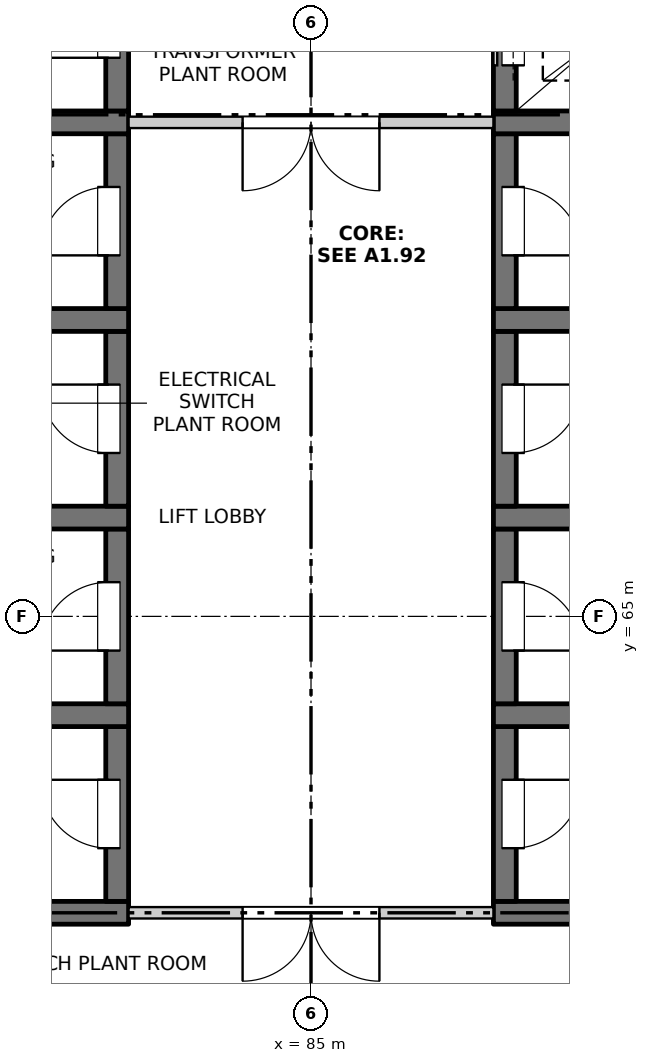
"""IFC4 building model, lengths in metres.
Left out: names, types, materials, properties, quantities, classifications, styles, units other than length and angle.
Written with IfcOpenShell. Run it as: python <this file> out.ifc"""

import sys

from ifc_helpers import new_model, si_unit, direction, frame, frame_2d, origin, place, context, subcontext, project, spatial, rectangle, extrude, element, fill, save


model = new_model("IFC4")
c1 = context("Model", 3, precision=1e-05, world=origin(), true_north=direction((0.0, 1.0)))
c2 = subcontext(c1, "Body", "Model", "MODEL_VIEW")
j1 = project(units=[si_unit("LENGTHUNIT", "METRE"), si_unit("PLANEANGLEUNIT", "RADIAN")], contexts=[c1])
p1 = place(None, origin())
s1 = spatial("IfcSite", under=j1, at=p1, CompositionType="ELEMENT")
p2 = place(p1, origin())
s2 = spatial("IfcBuilding", under=s1, at=p2, CompositionType="ELEMENT")
p3 = place(p2, frame((0.0, 0.0, 144.1)))
s3 = spatial("IfcBuildingStorey", under=s2, at=p3, CompositionType="ELEMENT", Elevation=144.1)
p4 = place(p3, frame((79.6, 61.1, -0.3), z_axis=(0.0, 0.0, 1.0), x_axis=(1.0, 0.0, 0.0)))
e1 = element("IfcWall", 1, at=p4, inside=s3, PredefinedType="SOLIDWALL", context=c2, shape_type="SweptSolid", body=[
    extrude(rectangle(XDim=3.0, YDim=0.3, at=frame_2d((1.5, 0.0))), origin(), (0.0, 0.0, 1.0), 4.5),
])
p5 = place(p3, frame((82.45, 61.25, -0.3), z_axis=(0.0, 0.0, 1.0), x_axis=(0.0, 1.0, 0.0)))
e2 = element("IfcWall", 2, at=p5, inside=s3, PredefinedType="SOLIDWALL", context=c2, shape_type="SweptSolid", body=[
    extrude(rectangle(XDim=2.3, YDim=0.3, at=frame_2d((1.15, 0.0))), origin(), (0.0, 0.0, 1.0), 4.5),
])
p6 = place(p5, frame((0.7, 0.0, 0.3)))
e3 = element("IfcOpeningElement", 3, at=p6, cuts=e2, PredefinedType="OPENING", context=c2, shape_type="SweptSolid", body=[
    extrude(rectangle(XDim=0.9, YDim=2.1, at=frame_2d((0.45, 1.05))), frame((0.0, 0.16, 0.0), z_axis=(0.0, -1.0, 0.0), x_axis=(1.0, 0.0, 0.0)), (0.0, 0.0, 1.0), 0.32),
])
p7 = place(p3, frame((79.6, 63.7, -0.3), z_axis=(0.0, 0.0, 1.0), x_axis=(1.0, 0.0, 0.0)))
e4 = element("IfcWall", 4, at=p7, inside=s3, PredefinedType="SOLIDWALL", context=c2, shape_type="SweptSolid", body=[
    extrude(rectangle(XDim=3.0, YDim=0.3, at=frame_2d((1.5, 0.0))), origin(), (0.0, 0.0, 1.0), 4.5),
])
p8 = place(p3, frame((82.45, 63.85, -0.3), z_axis=(0.0, 0.0, 1.0), x_axis=(0.0, 1.0, 0.0)))
e5 = element("IfcWall", 5, at=p8, inside=s3, PredefinedType="SOLIDWALL", context=c2, shape_type="SweptSolid", body=[
    extrude(rectangle(XDim=2.3, YDim=0.3, at=frame_2d((1.15, 0.0))), origin(), (0.0, 0.0, 1.0), 4.5),
])
p9 = place(p8, frame((0.7, 0.0, 0.3)))
e6 = element("IfcOpeningElement", 6, at=p9, cuts=e5, PredefinedType="OPENING", context=c2, shape_type="SweptSolid", body=[
    extrude(rectangle(XDim=0.9, YDim=2.1, at=frame_2d((0.45, 1.05))), frame((0.0, 0.16, 0.0), z_axis=(0.0, -1.0, 0.0), x_axis=(1.0, 0.0, 0.0)), (0.0, 0.0, 1.0), 0.32),
])
p10 = place(p3, frame((79.6, 66.3, -0.3), z_axis=(0.0, 0.0, 1.0), x_axis=(1.0, 0.0, 0.0)))
e7 = element("IfcWall", 7, at=p10, inside=s3, PredefinedType="SOLIDWALL", context=c2, shape_type="SweptSolid", body=[
    extrude(rectangle(XDim=3.0, YDim=0.3, at=frame_2d((1.5, 0.0))), origin(), (0.0, 0.0, 1.0), 4.5),
])
p11 = place(p3, frame((82.45, 66.45, -0.3), z_axis=(0.0, 0.0, 1.0), x_axis=(0.0, 1.0, 0.0)))
e8 = element("IfcWall", 8, at=p11, inside=s3, PredefinedType="SOLIDWALL", context=c2, shape_type="SweptSolid", body=[
    extrude(rectangle(XDim=2.3, YDim=0.3, at=frame_2d((1.15, 0.0))), origin(), (0.0, 0.0, 1.0), 4.5),
])
p12 = place(p11, frame((0.7, 0.0, 0.3)))
e9 = element("IfcOpeningElement", 9, at=p12, cuts=e8, PredefinedType="OPENING", context=c2, shape_type="SweptSolid", body=[
    extrude(rectangle(XDim=0.9, YDim=2.1, at=frame_2d((0.45, 1.05))), frame((0.0, 0.16, 0.0), z_axis=(0.0, -1.0, 0.0), x_axis=(1.0, 0.0, 0.0)), (0.0, 0.0, 1.0), 0.32),
])
p13 = place(p3, frame((79.6, 68.9, -0.3), z_axis=(0.0, 0.0, 1.0), x_axis=(1.0, 0.0, 0.0)))
e10 = element("IfcWall", 10, at=p13, inside=s3, PredefinedType="SOLIDWALL", context=c2, shape_type="SweptSolid", body=[
    extrude(rectangle(XDim=3.0, YDim=0.3, at=frame_2d((1.5, 0.0))), origin(), (0.0, 0.0, 1.0), 4.5),
])
p14 = place(p3, frame((82.45, 69.05, -0.3), z_axis=(0.0, 0.0, 1.0), x_axis=(0.0, 1.0, 0.0)))
e11 = element("IfcWall", 11, at=p14, inside=s3, PredefinedType="SOLIDWALL", context=c2, shape_type="SweptSolid", body=[
    extrude(rectangle(XDim=2.3, YDim=0.3, at=frame_2d((1.15, 0.0))), origin(), (0.0, 0.0, 1.0), 4.5),
])
p15 = place(p14, frame((0.7, 0.0, 0.3)))
e12 = element("IfcOpeningElement", 12, at=p15, cuts=e11, PredefinedType="OPENING", context=c2, shape_type="SweptSolid", body=[
    extrude(rectangle(XDim=0.9, YDim=2.1, at=frame_2d((0.45, 1.05))), frame((0.0, 0.16, 0.0), z_axis=(0.0, -1.0, 0.0), x_axis=(1.0, 0.0, 0.0)), (0.0, 0.0, 1.0), 0.32),
])
p16 = place(p3, frame((79.6, 71.5, -0.3), z_axis=(0.0, 0.0, 1.0), x_axis=(1.0, 0.0, 0.0)))
e13 = element("IfcWall", 13, at=p16, inside=s3, PredefinedType="SOLIDWALL", context=c2, shape_type="SweptSolid", body=[
    extrude(rectangle(XDim=3.0, YDim=0.3, at=frame_2d((1.5, 0.0))), origin(), (0.0, 0.0, 1.0), 4.5),
])
p17 = place(p3, frame((82.45, 71.65, -0.3), z_axis=(0.0, 0.0, 1.0), x_axis=(0.0, 1.0, 0.0)))
e14 = element("IfcWall", 14, at=p17, inside=s3, PredefinedType="SOLIDWALL", context=c2, shape_type="SweptSolid", body=[
    extrude(rectangle(XDim=2.3, YDim=0.3, at=frame_2d((1.15, 0.0))), origin(), (0.0, 0.0, 1.0), 4.5),
])
p18 = place(p17, frame((0.7, 0.0, 0.3)))
e15 = element("IfcOpeningElement", 15, at=p18, cuts=e14, PredefinedType="OPENING", context=c2, shape_type="SweptSolid", body=[
    extrude(rectangle(XDim=0.9, YDim=2.1, at=frame_2d((0.45, 1.05))), frame((0.0, 0.16, 0.0), z_axis=(0.0, -1.0, 0.0), x_axis=(1.0, 0.0, 0.0)), (0.0, 0.0, 1.0), 0.32),
])
p19 = place(p3, frame((87.4, 61.1, -0.3), z_axis=(0.0, 0.0, 1.0), x_axis=(1.0, 0.0, 0.0)))
e16 = element("IfcWall", 16, at=p19, inside=s3, PredefinedType="SOLIDWALL", context=c2, shape_type="SweptSolid", body=[
    extrude(rectangle(XDim=3.0, YDim=0.3, at=frame_2d((1.5, 0.0))), origin(), (0.0, 0.0, 1.0), 4.5),
])
p20 = place(p3, frame((87.55, 61.25, -0.3), z_axis=(0.0, 0.0, 1.0), x_axis=(0.0, 1.0, 0.0)))
e17 = element("IfcWall", 17, at=p20, inside=s3, PredefinedType="SOLIDWALL", context=c2, shape_type="SweptSolid", body=[
    extrude(rectangle(XDim=2.3, YDim=0.3, at=frame_2d((1.15, 0.0))), origin(), (0.0, 0.0, 1.0), 4.5),
])
p21 = place(p20, frame((0.7, 0.0, 0.3)))
e18 = element("IfcOpeningElement", 18, at=p21, cuts=e17, PredefinedType="OPENING", context=c2, shape_type="SweptSolid", body=[
    extrude(rectangle(XDim=0.9, YDim=2.1, at=frame_2d((0.45, 1.05))), frame((0.0, 0.16, 0.0), z_axis=(0.0, -1.0, 0.0), x_axis=(1.0, 0.0, 0.0)), (0.0, 0.0, 1.0), 0.32),
])
p22 = place(p3, frame((87.4, 63.7, -0.3), z_axis=(0.0, 0.0, 1.0), x_axis=(1.0, 0.0, 0.0)))
e19 = element("IfcWall", 19, at=p22, inside=s3, PredefinedType="SOLIDWALL", context=c2, shape_type="SweptSolid", body=[
    extrude(rectangle(XDim=3.0, YDim=0.3, at=frame_2d((1.5, 0.0))), origin(), (0.0, 0.0, 1.0), 4.5),
])
p23 = place(p3, frame((87.55, 63.85, -0.3), z_axis=(0.0, 0.0, 1.0), x_axis=(0.0, 1.0, 0.0)))
e20 = element("IfcWall", 20, at=p23, inside=s3, PredefinedType="SOLIDWALL", context=c2, shape_type="SweptSolid", body=[
    extrude(rectangle(XDim=2.3, YDim=0.3, at=frame_2d((1.15, 0.0))), origin(), (0.0, 0.0, 1.0), 4.5),
])
p24 = place(p23, frame((0.7, 0.0, 0.3)))
e21 = element("IfcOpeningElement", 21, at=p24, cuts=e20, PredefinedType="OPENING", context=c2, shape_type="SweptSolid", body=[
    extrude(rectangle(XDim=0.9, YDim=2.1, at=frame_2d((0.45, 1.05))), frame((0.0, 0.16, 0.0), z_axis=(0.0, -1.0, 0.0), x_axis=(1.0, 0.0, 0.0)), (0.0, 0.0, 1.0), 0.32),
])
p25 = place(p3, frame((87.4, 66.3, -0.3), z_axis=(0.0, 0.0, 1.0), x_axis=(1.0, 0.0, 0.0)))
e22 = element("IfcWall", 22, at=p25, inside=s3, PredefinedType="SOLIDWALL", context=c2, shape_type="SweptSolid", body=[
    extrude(rectangle(XDim=3.0, YDim=0.3, at=frame_2d((1.5, 0.0))), origin(), (0.0, 0.0, 1.0), 4.5),
])
p26 = place(p3, frame((87.55, 66.45, -0.3), z_axis=(0.0, 0.0, 1.0), x_axis=(0.0, 1.0, 0.0)))
e23 = element("IfcWall", 23, at=p26, inside=s3, PredefinedType="SOLIDWALL", context=c2, shape_type="SweptSolid", body=[
    extrude(rectangle(XDim=2.3, YDim=0.3, at=frame_2d((1.15, 0.0))), origin(), (0.0, 0.0, 1.0), 4.5),
])
p27 = place(p26, frame((0.7, 0.0, 0.3)))
e24 = element("IfcOpeningElement", 24, at=p27, cuts=e23, PredefinedType="OPENING", context=c2, shape_type="SweptSolid", body=[
    extrude(rectangle(XDim=0.9, YDim=2.1, at=frame_2d((0.45, 1.05))), frame((0.0, 0.16, 0.0), z_axis=(0.0, -1.0, 0.0), x_axis=(1.0, 0.0, 0.0)), (0.0, 0.0, 1.0), 0.32),
])
p28 = place(p3, frame((87.4, 68.9, -0.3), z_axis=(0.0, 0.0, 1.0), x_axis=(1.0, 0.0, 0.0)))
e25 = element("IfcWall", 25, at=p28, inside=s3, PredefinedType="SOLIDWALL", context=c2, shape_type="SweptSolid", body=[
    extrude(rectangle(XDim=3.0, YDim=0.3, at=frame_2d((1.5, 0.0))), origin(), (0.0, 0.0, 1.0), 4.5),
])
p29 = place(p3, frame((87.55, 69.05, -0.3), z_axis=(0.0, 0.0, 1.0), x_axis=(0.0, 1.0, 0.0)))
e26 = element("IfcWall", 26, at=p29, inside=s3, PredefinedType="SOLIDWALL", context=c2, shape_type="SweptSolid", body=[
    extrude(rectangle(XDim=2.3, YDim=0.3, at=frame_2d((1.15, 0.0))), origin(), (0.0, 0.0, 1.0), 4.5),
])
p30 = place(p29, frame((0.7, 0.0, 0.3)))
e27 = element("IfcOpeningElement", 27, at=p30, cuts=e26, PredefinedType="OPENING", context=c2, shape_type="SweptSolid", body=[
    extrude(rectangle(XDim=0.9, YDim=2.1, at=frame_2d((0.45, 1.05))), frame((0.0, 0.16, 0.0), z_axis=(0.0, -1.0, 0.0), x_axis=(1.0, 0.0, 0.0)), (0.0, 0.0, 1.0), 0.32),
])
p31 = place(p3, frame((87.4, 71.5, -0.3), z_axis=(0.0, 0.0, 1.0), x_axis=(1.0, 0.0, 0.0)))
e28 = element("IfcWall", 28, at=p31, inside=s3, PredefinedType="SOLIDWALL", context=c2, shape_type="SweptSolid", body=[
    extrude(rectangle(XDim=3.0, YDim=0.3, at=frame_2d((1.5, 0.0))), origin(), (0.0, 0.0, 1.0), 4.5),
])
p32 = place(p3, frame((87.55, 71.65, -0.3), z_axis=(0.0, 0.0, 1.0), x_axis=(0.0, 1.0, 0.0)))
e29 = element("IfcWall", 29, at=p32, inside=s3, PredefinedType="SOLIDWALL", context=c2, shape_type="SweptSolid", body=[
    extrude(rectangle(XDim=2.3, YDim=0.3, at=frame_2d((1.15, 0.0))), origin(), (0.0, 0.0, 1.0), 4.5),
])
p33 = place(p32, frame((0.6, 0.0, 0.3)))
e30 = element("IfcOpeningElement", 30, at=p33, cuts=e29, PredefinedType="OPENING", context=c2, shape_type="SweptSolid", body=[
    extrude(rectangle(XDim=1.1, YDim=2.1, at=frame_2d((0.55, 1.05))), frame((0.0, 0.16, 0.0), z_axis=(0.0, -1.0, 0.0), x_axis=(1.0, 0.0, 0.0)), (0.0, 0.0, 1.0), 0.32),
])
p34 = place(p3, frame((82.6, 61.1, 0.0), z_axis=(0.0, 0.0, 1.0), x_axis=(1.0, 0.0, 0.0)))
e31 = element("IfcWall", 31, at=p34, inside=s3, PredefinedType="PARTITIONING", context=c2, shape_type="SweptSolid", body=[
    extrude(rectangle(XDim=4.8, YDim=0.15, at=frame_2d((2.4, 0.0))), origin(), (0.0, 0.0, 1.0), 4.2),
])
p35 = place(p34, frame((1.5, 0.0, 0.0)))
e32 = element("IfcOpeningElement", 32, at=p35, cuts=e31, PredefinedType="OPENING", context=c2, shape_type="SweptSolid", body=[
    extrude(rectangle(XDim=1.8, YDim=2.1, at=frame_2d((0.9, 1.05))), frame((0.0, 0.085, 0.0), z_axis=(0.0, -1.0, 0.0), x_axis=(1.0, 0.0, 0.0)), (0.0, 0.0, 1.0), 0.17),
])
p36 = place(p3, frame((82.6, 71.5, 0.0), z_axis=(0.0, 0.0, 1.0), x_axis=(1.0, 0.0, 0.0)))
e33 = element("IfcWall", 33, at=p36, inside=s3, PredefinedType="PARTITIONING", context=c2, shape_type="SweptSolid", body=[
    extrude(rectangle(XDim=4.8, YDim=0.15, at=frame_2d((2.4, 0.0))), origin(), (0.0, 0.0, 1.0), 4.2),
])
p37 = place(p36, frame((1.5, 0.0, 0.0)))
e34 = element("IfcOpeningElement", 34, at=p37, cuts=e33, PredefinedType="OPENING", context=c2, shape_type="SweptSolid", body=[
    extrude(rectangle(XDim=1.8, YDim=2.1, at=frame_2d((0.9, 1.05))), frame((0.0, 0.085, 0.0), z_axis=(0.0, -1.0, 0.0), x_axis=(1.0, 0.0, 0.0)), (0.0, 0.0, 1.0), 0.17),
])
p38 = place(p35, origin())
e35 = element("IfcDoor", 35, at=p38, inside=s3, OperationType="DOUBLE_DOOR_SINGLE_SWING", PredefinedType="DOOR", context=c2, shape_type="SweptSolid", body=[
    extrude(rectangle(XDim=1.8, YDim=2.1, at=frame_2d((0.9, 1.05))), frame((0.0, 0.025, 0.0), z_axis=(0.0, -1.0, 0.0), x_axis=(1.0, 0.0, 0.0)), (0.0, 0.0, 1.0), 0.05),
])
fill(e32, e35)
p39 = place(p6, origin())
e36 = element("IfcDoor", 36, at=p39, inside=s3, OperationType="SINGLE_SWING_RIGHT", PredefinedType="DOOR", context=c2, shape_type="SweptSolid", body=[
    extrude(rectangle(XDim=0.9, YDim=2.1, at=frame_2d((0.45, 1.05))), frame((0.0, 0.135, 0.0), z_axis=(0.0, -1.0, 0.0), x_axis=(1.0, 0.0, 0.0)), (0.0, 0.0, 1.0), 0.05),
])
fill(e3, e36)
p40 = place(p21, origin())
e37 = element("IfcDoor", 37, at=p40, inside=s3, OperationType="SINGLE_SWING_LEFT", PredefinedType="DOOR", context=c2, shape_type="SweptSolid", body=[
    extrude(rectangle(XDim=0.9, YDim=2.1, at=frame_2d((0.45, 1.05))), frame((0.0, -0.085, 0.0), z_axis=(0.0, -1.0, 0.0), x_axis=(1.0, 0.0, 0.0)), (0.0, 0.0, 1.0), 0.05),
])
fill(e18, e37)
p41 = place(p9, origin())
e38 = element("IfcDoor", 38, at=p41, inside=s3, OperationType="SINGLE_SWING_LEFT", PredefinedType="DOOR", context=c2, shape_type="SweptSolid", body=[
    extrude(rectangle(XDim=0.9, YDim=2.1, at=frame_2d((0.45, 1.05))), frame((0.0, 0.135, 0.0), z_axis=(0.0, -1.0, 0.0), x_axis=(1.0, 0.0, 0.0)), (0.0, 0.0, 1.0), 0.05),
])
fill(e6, e38)
p42 = place(p24, origin())
e39 = element("IfcDoor", 39, at=p42, inside=s3, OperationType="SINGLE_SWING_RIGHT", PredefinedType="DOOR", context=c2, shape_type="SweptSolid", body=[
    extrude(rectangle(XDim=0.9, YDim=2.1, at=frame_2d((0.45, 1.05))), frame((0.0, -0.085, 0.0), z_axis=(0.0, -1.0, 0.0), x_axis=(1.0, 0.0, 0.0)), (0.0, 0.0, 1.0), 0.05),
])
fill(e21, e39)
p43 = place(p12, origin())
e40 = element("IfcDoor", 40, at=p43, inside=s3, OperationType="SINGLE_SWING_RIGHT", PredefinedType="DOOR", context=c2, shape_type="SweptSolid", body=[
    extrude(rectangle(XDim=0.9, YDim=2.1, at=frame_2d((0.45, 1.05))), frame((0.0, 0.135, 0.0), z_axis=(0.0, -1.0, 0.0), x_axis=(1.0, 0.0, 0.0)), (0.0, 0.0, 1.0), 0.05),
])
fill(e9, e40)
p44 = place(p27, origin())
e41 = element("IfcDoor", 41, at=p44, inside=s3, OperationType="SINGLE_SWING_LEFT", PredefinedType="DOOR", context=c2, shape_type="SweptSolid", body=[
    extrude(rectangle(XDim=0.9, YDim=2.1, at=frame_2d((0.45, 1.05))), frame((0.0, -0.085, 0.0), z_axis=(0.0, -1.0, 0.0), x_axis=(1.0, 0.0, 0.0)), (0.0, 0.0, 1.0), 0.05),
])
fill(e24, e41)
p45 = place(p15, origin())
e42 = element("IfcDoor", 42, at=p45, inside=s3, OperationType="SINGLE_SWING_LEFT", PredefinedType="DOOR", context=c2, shape_type="SweptSolid", body=[
    extrude(rectangle(XDim=0.9, YDim=2.1, at=frame_2d((0.45, 1.05))), frame((0.0, 0.135, 0.0), z_axis=(0.0, -1.0, 0.0), x_axis=(1.0, 0.0, 0.0)), (0.0, 0.0, 1.0), 0.05),
])
fill(e12, e42)
p46 = place(p30, origin())
e43 = element("IfcDoor", 43, at=p46, inside=s3, OperationType="SINGLE_SWING_RIGHT", PredefinedType="DOOR", context=c2, shape_type="SweptSolid", body=[
    extrude(rectangle(XDim=0.9, YDim=2.1, at=frame_2d((0.45, 1.05))), frame((0.0, -0.085, 0.0), z_axis=(0.0, -1.0, 0.0), x_axis=(1.0, 0.0, 0.0)), (0.0, 0.0, 1.0), 0.05),
])
fill(e27, e43)
p47 = place(p37, origin())
e44 = element("IfcDoor", 44, at=p47, inside=s3, OperationType="DOUBLE_DOOR_SINGLE_SWING", PredefinedType="DOOR", context=c2, shape_type="SweptSolid", body=[
    extrude(rectangle(XDim=1.8, YDim=2.1, at=frame_2d((0.9, 1.05))), frame((0.0, 0.025, 0.0), z_axis=(0.0, -1.0, 0.0), x_axis=(1.0, 0.0, 0.0)), (0.0, 0.0, 1.0), 0.05),
])
fill(e34, e44)
p48 = place(p18, origin())
e45 = element("IfcDoor", 45, at=p48, inside=s3, OperationType="SINGLE_SWING_LEFT", PredefinedType="DOOR", context=c2, shape_type="SweptSolid", body=[
    extrude(rectangle(XDim=0.9, YDim=2.1, at=frame_2d((0.45, 1.05))), frame((0.0, 0.135, 0.0), z_axis=(0.0, -1.0, 0.0), x_axis=(1.0, 0.0, 0.0)), (0.0, 0.0, 1.0), 0.05),
])
fill(e15, e45)
p49 = place(p33, origin())
e46 = element("IfcDoor", 46, at=p49, inside=s3, OperationType="SLIDING_TO_LEFT", PredefinedType="DOOR", context=c2, shape_type="SweptSolid", body=[
    extrude(rectangle(XDim=1.1, YDim=2.1, at=frame_2d((0.55, 1.05))), frame((0.0, -0.085, 0.0), z_axis=(0.0, -1.0, 0.0), x_axis=(1.0, 0.0, 0.0)), (0.0, 0.0, 1.0), 0.05),
])
fill(e30, e46)
save(model, sys.argv[1])
